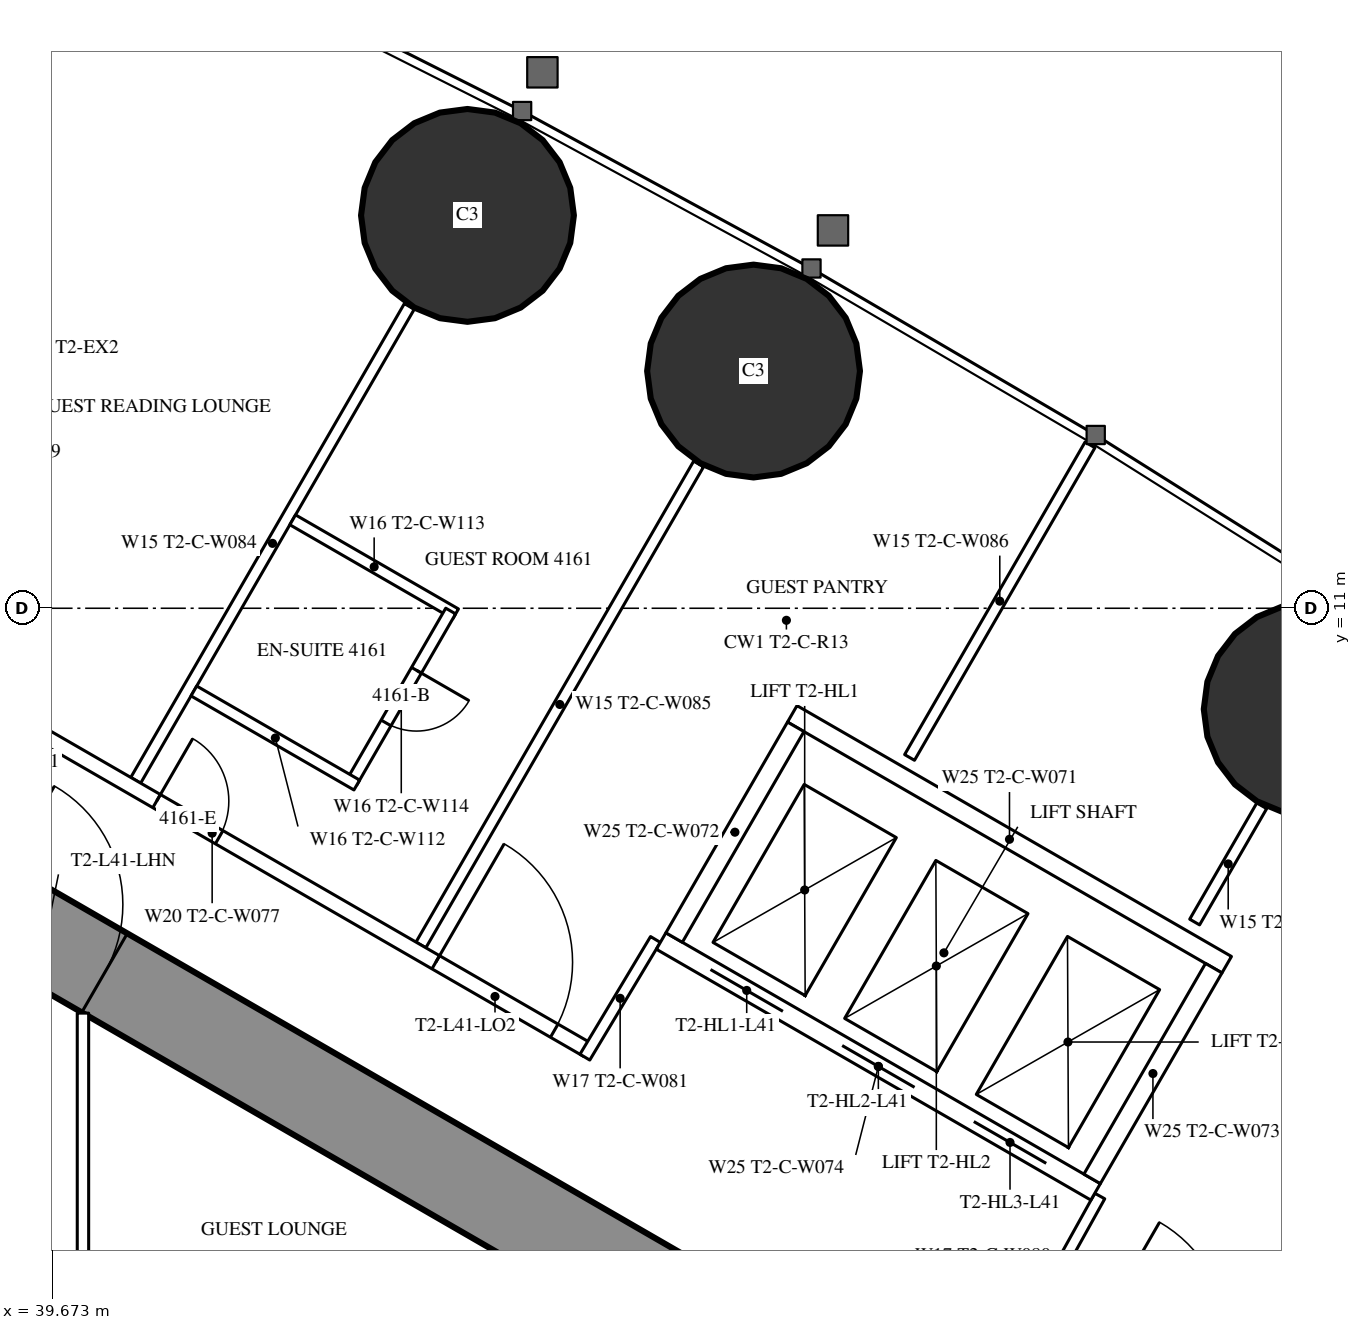
"""IFC4 building model, lengths in metres.
Left out: names, types, materials, properties, quantities, classifications, styles, units other than length and angle.
Written with IfcOpenShell. Run it as: python <this file> out.ifc"""

import sys

from ifc_helpers import new_model, si_unit, direction, frame, frame_2d, origin, origin_2d, place, context, subcontext, project, spatial, rectangle, circle, extrude, element, fill, save


model = new_model("IFC4")
c1 = context("Model", 3, precision=1e-05, world=origin(), true_north=direction((0.0, 1.0)))
c2 = subcontext(c1, "Body", "Model", "MODEL_VIEW")
j1 = project(units=[si_unit("LENGTHUNIT", "METRE"), si_unit("PLANEANGLEUNIT", "RADIAN")], contexts=[c1])
p1 = place(None, origin())
s1 = spatial("IfcSite", under=j1, at=p1, CompositionType="ELEMENT")
p2 = place(p1, origin())
s2 = spatial("IfcBuilding", under=s1, at=p2, CompositionType="ELEMENT")
p3 = place(p2, frame((0.0, 0.0, 156.3)))
s3 = spatial("IfcBuildingStorey", under=s2, at=p3, CompositionType="ELEMENT", Elevation=156.3)
for number, where, z_axis, x_axis in (
    (1, (56.221, 9.672, 0.0), (0.0, 0.0, 1.0), (1.0, 0.0, 0.0)),
    (2, (48.897, 14.121, 0.0), (0.0, 0.0, 1.0), (1.0, 0.0, 0.0)),
    (3, (45.134, 16.168, 0.0), (0.0, 0.0, 1.0), (1.0, 0.0, 0.0)),
):
    element("IfcColumn", number, at=place(p3, frame(where, z_axis=z_axis, x_axis=x_axis)), inside=s3, PredefinedType="COLUMN", context=c2, shape_type="SweptSolid", body=[
        extrude(circle(Radius=1.4, at=origin_2d()), origin(), (0.0, 0.0, 1.0), 3.5),
    ])
p4 = place(p3, frame((27.2, 13.8, 0.0), z_axis=(0.0, 0.0, 1.0), x_axis=(0.866024515034, -0.500001539357, 0.0)))
e4 = element("IfcWall", 4, at=p4, inside=s3, PredefinedType="SHEAR", context=c2, shape_type="SweptSolid", body=[
    extrude(rectangle(XDim=26.907, YDim=1.2, at=frame_2d((13.454, 0.0))), origin(), (0.0, 0.0, 1.0), 3.5),
])
p5 = place(p4, frame((4.6, 0.0, 0.0)))
e5 = element("IfcOpeningElement", 5, at=p5, cuts=e4, PredefinedType="OPENING", context=c2, shape_type="SweptSolid", body=[
    extrude(rectangle(XDim=1.0, YDim=2.2, at=frame_2d((0.5, 1.1))), frame((0.0, 0.61, 0.0), z_axis=(0.0, -1.0, 0.0), x_axis=(1.0, 0.0, 0.0)), (0.0, 0.0, 1.0), 1.22),
])
p6 = place(p4, frame((13.395, 0.0, 0.0)))
e6 = element("IfcOpeningElement", 6, at=p6, cuts=e4, PredefinedType="OPENING", context=c2, shape_type="SweptSolid", body=[
    extrude(rectangle(XDim=1.8, YDim=2.2, at=frame_2d((0.9, 1.1))), frame((0.0, 0.61, 0.0), z_axis=(0.0, -1.0, 0.0), x_axis=(1.0, 0.0, 0.0)), (0.0, 0.0, 1.0), 1.22),
])
p7 = place(p3, frame((40.769, 8.737, 0.0), z_axis=(0.0, 0.0, 1.0), x_axis=(0.500013115284, 0.866017831539, 0.0)))
e7 = element("IfcWall", 7, at=p7, inside=s3, PredefinedType="PARTITIONING", context=c2, shape_type="SweptSolid", body=[
    extrude(rectangle(XDim=7.198, YDim=0.15, at=frame_2d((3.599, 0.0))), origin(), (0.0, 0.0, 1.0), 2.3),
])
p8 = place(p3, frame((44.521, 6.571, 0.0), z_axis=(0.0, 0.0, 1.0), x_axis=(0.500020376429, 0.866013639128, 0.0)))
e8 = element("IfcWall", 8, at=p8, inside=s3, PredefinedType="PARTITIONING", context=c2, shape_type="SweptSolid", body=[
    extrude(rectangle(XDim=7.306, YDim=0.15, at=frame_2d((3.653, 0.0))), origin(), (0.0, 0.0, 1.0), 2.3),
])
p9 = place(p3, frame((50.95, 9.037, 0.0), z_axis=(0.0, 0.0, 1.0), x_axis=(0.499988022762, 0.866032318735, 0.0)))
e9 = element("IfcWall", 9, at=p9, inside=s3, PredefinedType="PARTITIONING", context=c2, shape_type="SweptSolid", body=[
    extrude(rectangle(XDim=4.748, YDim=0.15, at=frame_2d((2.374, 0.0))), origin(), (0.0, 0.0, 1.0), 3.25),
])
p10 = place(p3, frame((54.7, 6.872, 0.0), z_axis=(0.0, 0.0, 1.0), x_axis=(0.499989690894, 0.866031355668, 0.0)))
e10 = element("IfcWall", 10, at=p10, inside=s3, PredefinedType="PARTITIONING", context=c2, shape_type="SweptSolid", body=[
    extrude(rectangle(XDim=1.766, YDim=0.15, at=frame_2d((0.883, 0.0))), origin(), (0.0, 0.0, 1.0), 3.25),
])
p11 = place(p3, frame((36.834, 10.894, 0.0), z_axis=(0.0, 0.0, 1.0), x_axis=(0.866031655879, -0.499989170898, 0.0)))
e11 = element("IfcWall", 11, at=p11, inside=s3, PredefinedType="PARTITIONING", context=c2, shape_type="SweptSolid", body=[
    extrude(rectangle(XDim=11.41, YDim=0.2, at=frame_2d((5.705, 0.0))), origin(), (0.0, 0.0, 1.0), 3.25),
])
p12 = place(p11, frame((4.861, 0.0, 0.0)))
e12 = element("IfcOpeningElement", 12, at=p12, cuts=e11, PredefinedType="OPENING", context=c2, shape_type="SweptSolid", body=[
    extrude(rectangle(XDim=0.95, YDim=2.2, at=frame_2d((0.475, 1.1))), frame((0.0, 0.11, 0.0), z_axis=(0.0, -1.0, 0.0), x_axis=(1.0, 0.0, 0.0)), (0.0, 0.0, 1.0), 0.22),
])
p13 = place(p11, frame((1.881, 0.0, 0.0)))
e13 = element("IfcOpeningElement", 13, at=p13, cuts=e11, PredefinedType="OPENING", context=c2, shape_type="SweptSolid", body=[
    extrude(rectangle(XDim=0.95, YDim=2.2, at=frame_2d((0.475, 1.1))), frame((0.0, 0.11, 0.0), z_axis=(0.0, -1.0, 0.0), x_axis=(1.0, 0.0, 0.0)), (0.0, 0.0, 1.0), 0.22),
])
p14 = place(p11, frame((9.102, 0.0, 0.0)))
e14 = element("IfcOpeningElement", 14, at=p14, cuts=e11, PredefinedType="OPENING", context=c2, shape_type="SweptSolid", body=[
    extrude(rectangle(XDim=1.8, YDim=2.2, at=frame_2d((0.9, 1.1))), frame((0.0, 0.11, 0.0), z_axis=(0.0, -1.0, 0.0), x_axis=(1.0, 0.0, 0.0)), (0.0, 0.0, 1.0), 0.22),
])
for number, where, z_axis, x_axis in (
    (15, (52.576, 1.689, 0.0), (0.0, 0.0, 1.0), (0.485, 0.874, 0.0)),
    (16, (47.606, 6.643, 0.0), (0.0, 0.0, 1.0), (-0.514, -0.858, 0.0)),
):
    element("IfcWall", number, at=place(p3, frame(where, z_axis=z_axis, x_axis=x_axis)), inside=s3, PredefinedType="PARTITIONING", context=c2, shape_type="SweptSolid", body=[
        extrude(rectangle(XDim=1.805, YDim=0.15, at=frame_2d((0.902, 0.0))), origin(), (0.0, 0.0, 1.0), 3.25),
    ])
p15 = place(p3, frame((42.834, 12.164, 0.0), z_axis=(0.0, 0.0, 1.0), x_axis=(0.866031185235, -0.4999899861, 0.0)))
e17 = element("IfcWall", 17, at=p15, inside=s3, PredefinedType="PARTITIONING", context=c2, shape_type="SweptSolid", body=[
    extrude(rectangle(XDim=2.475, YDim=0.15, at=frame_2d((1.238, 0.0))), origin(), (0.0, 0.0, 1.0), 3.25),
])
p16 = place(p3, frame((43.613, 8.712, 0.0), z_axis=(0.0, 0.0, 1.0), x_axis=(0.500006934395, 0.866021400173, 0.0)))
e18 = element("IfcWall", 18, at=p16, inside=s3, PredefinedType="PARTITIONING", context=c2, shape_type="SweptSolid", body=[
    extrude(rectangle(XDim=2.6, YDim=0.15, at=frame_2d((1.3, 0.0))), origin(), (0.0, 0.0, 1.0), 3.25),
])
p17 = place(p16, frame((0.9, 0.0, 0.0)))
e19 = element("IfcOpeningElement", 19, at=p17, cuts=e18, PredefinedType="OPENING", context=c2, shape_type="SweptSolid", body=[
    extrude(rectangle(XDim=0.8, YDim=2.2, at=frame_2d((0.4, 1.1))), frame((0.0, 0.085, 0.0), z_axis=(0.0, -1.0, 0.0), x_axis=(1.0, 0.0, 0.0)), (0.0, 0.0, 1.0), 0.17),
])
p18 = place(p3, frame((41.534, 9.912, 0.0), z_axis=(0.0, 0.0, 1.0), x_axis=(0.866031185235, -0.4999899861, 0.0)))
e20 = element("IfcWall", 20, at=p18, inside=s3, PredefinedType="PARTITIONING", context=c2, shape_type="SweptSolid", body=[
    extrude(rectangle(XDim=2.475, YDim=0.15, at=frame_2d((1.238, 0.0))), origin(), (0.0, 0.0, 1.0), 2.45),
])
p19 = place(p3, frame((40.075, -5.674, 0.0), z_axis=(0.0, 0.0, 1.0), x_axis=(0.0, 1.0, 0.0)))
e21 = element("IfcWall", 21, at=p19, inside=s3, PredefinedType="PARTITIONING", context=c2, shape_type="SweptSolid", body=[
    extrude(rectangle(XDim=11.348, YDim=0.15, at=frame_2d((5.674, 0.0))), origin(), (0.0, 0.0, 1.0), 3.25),
])
p20 = place(p19, frame((4.774, 0.0, 0.0)))
e22 = element("IfcOpeningElement", 22, at=p20, cuts=e21, PredefinedType="OPENING", context=c2, shape_type="SweptSolid", body=[
    extrude(rectangle(XDim=1.8, YDim=2.2, at=frame_2d((0.9, 1.1))), frame((0.0, 0.085, 0.0), z_axis=(0.0, -1.0, 0.0), x_axis=(1.0, 0.0, 0.0)), (0.0, 0.0, 1.0), 0.17),
])
p21 = place(p3, frame((47.681, 6.622, 0.0), z_axis=(0.0, 0.0, 1.0), x_axis=(0.86603344179, -0.499986077507, 0.0)))
e23 = element("IfcWall", 23, at=p21, inside=s3, PredefinedType="PARTITIONING", context=c2, shape_type="SweptSolid", body=[
    extrude(rectangle(XDim=6.6, YDim=0.25, at=frame_2d((3.3, 0.0))), origin(), (0.0, 0.0, 1.0), 3.25),
])
p22 = place(p21, frame((0.75, 0.0, 0.0)))
e24 = element("IfcOpeningElement", 24, at=p22, cuts=e23, PredefinedType="OPENING", context=c2, shape_type="SweptSolid", body=[
    extrude(rectangle(XDim=1.1, YDim=2.2, at=frame_2d((0.55, 1.1))), frame((0.0, 0.135, 0.0), z_axis=(0.0, -1.0, 0.0), x_axis=(1.0, 0.0, 0.0)), (0.0, 0.0, 1.0), 0.27),
])
p23 = place(p21, frame((2.75, 0.0, 0.0)))
e25 = element("IfcOpeningElement", 25, at=p23, cuts=e23, PredefinedType="OPENING", context=c2, shape_type="SweptSolid", body=[
    extrude(rectangle(XDim=1.1, YDim=2.2, at=frame_2d((0.55, 1.1))), frame((0.0, 0.135, 0.0), z_axis=(0.0, -1.0, 0.0), x_axis=(1.0, 0.0, 0.0)), (0.0, 0.0, 1.0), 0.27),
])
p24 = place(p21, frame((4.75, 0.0, 0.0)))
e26 = element("IfcOpeningElement", 26, at=p24, cuts=e23, PredefinedType="OPENING", context=c2, shape_type="SweptSolid", body=[
    extrude(rectangle(XDim=1.1, YDim=2.2, at=frame_2d((0.55, 1.1))), frame((0.0, 0.135, 0.0), z_axis=(0.0, -1.0, 0.0), x_axis=(1.0, 0.0, 0.0)), (0.0, 0.0, 1.0), 0.27),
])
p25 = place(p3, frame((49.406, 9.611, 0.0), z_axis=(0.0, 0.0, 1.0), x_axis=(0.86603344179, -0.499986077507, 0.0)))
e27 = element("IfcWall", 27, at=p25, inside=s3, PredefinedType="PARTITIONING", context=c2, shape_type="SweptSolid", body=[
    extrude(rectangle(XDim=6.6, YDim=0.25, at=frame_2d((3.3, 0.0))), origin(), (0.0, 0.0, 1.0), 3.25),
])
p26 = place(p3, frame((47.852, 6.668, 0.0), z_axis=(0.0, 0.0, 1.0), x_axis=(0.499929347863, 0.866066190972, 0.0)))
e28 = element("IfcWall", 28, at=p26, inside=s3, PredefinedType="PARTITIONING", context=c2, shape_type="SweptSolid", body=[
    extrude(rectangle(XDim=3.201, YDim=0.25, at=frame_2d((1.6, 0.0))), origin(), (0.0, 0.0, 1.0), 3.25),
])
p27 = place(p3, frame((53.352, 3.493, 0.0), z_axis=(0.0, 0.0, 1.0), x_axis=(0.499872130319, 0.866099216793, 0.0)))
e29 = element("IfcWall", 29, at=p27, inside=s3, PredefinedType="PARTITIONING", context=c2, shape_type="SweptSolid", body=[
    extrude(rectangle(XDim=3.2, YDim=0.25, at=frame_2d((1.6, 0.0))), origin(), (0.0, 0.0, 1.0), 3.25),
])
p28 = place(p17, origin())
e30 = element("IfcDoor", 30, at=p28, inside=s3, OperationType="SINGLE_SWING_RIGHT", PredefinedType="DOOR", context=c2, shape_type="SweptSolid", body=[
    extrude(rectangle(XDim=0.8, YDim=2.2, at=frame_2d((0.4, 1.1))), frame((0.0, 0.025, 0.0), z_axis=(0.0, -1.0, 0.0), x_axis=(1.0, 0.0, 0.0)), (0.0, 0.0, 1.0), 0.05),
])
fill(e19, e30)
p29 = place(p12, origin())
e31 = element("IfcDoor", 31, at=p29, inside=s3, OperationType="SINGLE_SWING_LEFT", PredefinedType="DOOR", context=c2, shape_type="SweptSolid", body=[
    extrude(rectangle(XDim=0.95, YDim=2.2, at=frame_2d((0.475, 1.1))), frame((0.0, 0.025, 0.0), z_axis=(0.0, -1.0, 0.0), x_axis=(1.0, 0.0, 0.0)), (0.0, 0.0, 1.0), 0.05),
])
fill(e12, e31)
p30 = place(p14, origin())
e32 = element("IfcDoor", 32, at=p30, inside=s3, OperationType="DOUBLE_DOOR_SINGLE_SWING", PredefinedType="DOOR", context=c2, shape_type="SweptSolid", body=[
    extrude(rectangle(XDim=1.8, YDim=2.2, at=frame_2d((0.9, 1.1))), frame((0.0, 0.025, 0.0), z_axis=(0.0, -1.0, 0.0), x_axis=(1.0, 0.0, 0.0)), (0.0, 0.0, 1.0), 0.05),
])
fill(e14, e32)
p31 = place(p6, origin())
e33 = element("IfcDoor", 33, at=p31, inside=s3, OperationType="DOUBLE_DOOR_SINGLE_SWING", PredefinedType="DOOR", context=c2, shape_type="SweptSolid", body=[
    extrude(rectangle(XDim=1.8, YDim=2.2, at=frame_2d((0.9, 1.1))), frame((0.0, 0.025, 0.0), z_axis=(0.0, -1.0, 0.0), x_axis=(1.0, 0.0, 0.0)), (0.0, 0.0, 1.0), 0.05),
])
fill(e6, e33)
p32 = place(p22, origin())
e34 = element("IfcDoor", 34, at=p32, inside=s3, OperationType="DOUBLE_DOOR_SLIDING", PredefinedType="USERDEFINED", context=c2, shape_type="SweptSolid", body=[
    extrude(rectangle(XDim=1.1, YDim=2.2, at=frame_2d((0.55, 1.1))), frame((0.0, 0.025, 0.0), z_axis=(0.0, -1.0, 0.0), x_axis=(1.0, 0.0, 0.0)), (0.0, 0.0, 1.0), 0.05),
])
fill(e24, e34)
p33 = place(p23, origin())
e35 = element("IfcDoor", 35, at=p33, inside=s3, OperationType="DOUBLE_DOOR_SLIDING", PredefinedType="USERDEFINED", context=c2, shape_type="SweptSolid", body=[
    extrude(rectangle(XDim=1.1, YDim=2.2, at=frame_2d((0.55, 1.1))), frame((0.0, 0.025, 0.0), z_axis=(0.0, -1.0, 0.0), x_axis=(1.0, 0.0, 0.0)), (0.0, 0.0, 1.0), 0.05),
])
fill(e25, e35)
p34 = place(p24, origin())
e36 = element("IfcDoor", 36, at=p34, inside=s3, OperationType="DOUBLE_DOOR_SLIDING", PredefinedType="USERDEFINED", context=c2, shape_type="SweptSolid", body=[
    extrude(rectangle(XDim=1.1, YDim=2.2, at=frame_2d((0.55, 1.1))), frame((0.0, 0.025, 0.0), z_axis=(0.0, -1.0, 0.0), x_axis=(1.0, 0.0, 0.0)), (0.0, 0.0, 1.0), 0.05),
])
fill(e26, e36)
save(model, sys.argv[1])
